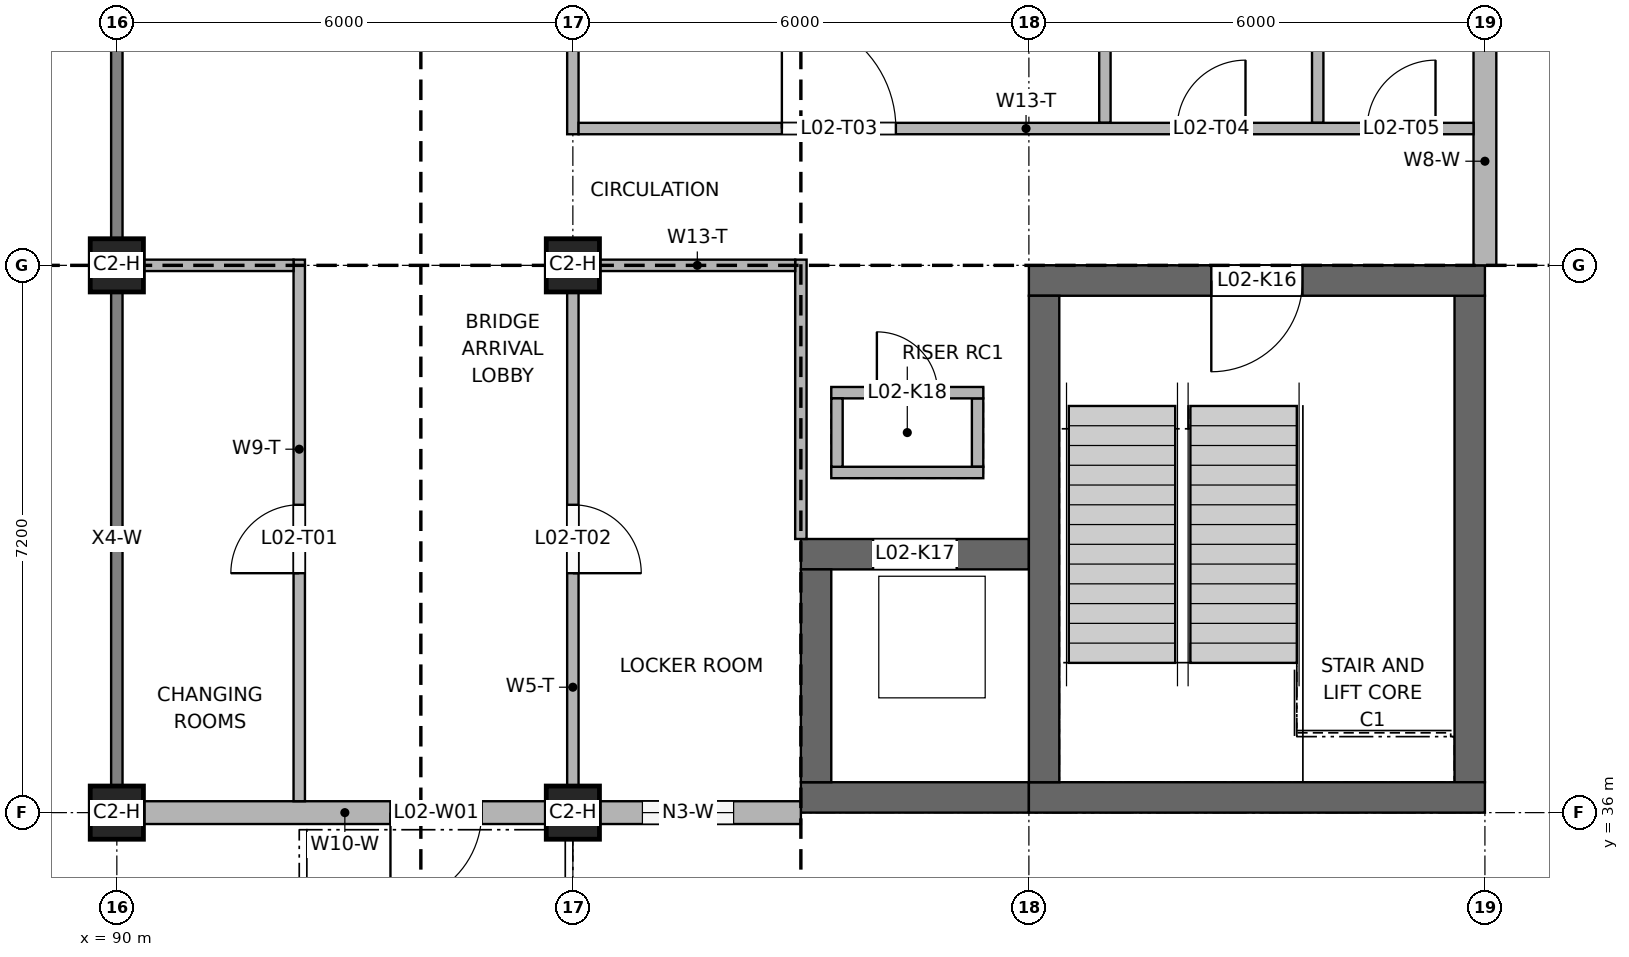
"""IFC4 building model, lengths in metres.
Left out: names, types, materials, properties, quantities, classifications, styles, units other than length and angle.
Written with IfcOpenShell. Run it as: python <this file> out.ifc"""

import sys

from ifc_helpers import new_model, si_unit, direction, frame, frame_2d, origin, origin_2d, place, context, subcontext, project, spatial, rectangle, extrude, element, fill, save


model = new_model("IFC4")
c1 = context("Model", 3, precision=1e-05, world=origin(), true_north=direction((0.0, 1.0)))
c2 = subcontext(c1, "Body", "Model", "MODEL_VIEW")
j1 = project(units=[si_unit("LENGTHUNIT", "METRE"), si_unit("PLANEANGLEUNIT", "RADIAN")], contexts=[c1])
p1 = place(None, origin())
s1 = spatial("IfcSite", under=j1, at=p1, CompositionType="ELEMENT")
p2 = place(p1, origin())
s2 = spatial("IfcBuilding", under=s1, at=p2, CompositionType="ELEMENT")
p3 = place(p2, frame((0.0, 0.0, 8.4)))
s3 = spatial("IfcBuildingStorey", under=s2, at=p3, CompositionType="ELEMENT", Elevation=8.4)
p4 = place(p3, frame((102.0, 36.2, 0.0), z_axis=(0.0, 0.0, 1.0), x_axis=(1.0, 0.0, 0.0)))
e1 = element("IfcWall", 1, at=p4, inside=s3, PredefinedType="SHEAR", context=c2, shape_type="SweptSolid", body=[
    extrude(rectangle(XDim=6.0, YDim=0.4, at=frame_2d((3.0, 0.0))), origin(), (0.0, 0.0, 1.0), 4.0),
])
p5 = place(p3, frame((102.0, 43.0, 0.0), z_axis=(0.0, 0.0, 1.0), x_axis=(1.0, 0.0, 0.0)))
e2 = element("IfcWall", 2, at=p5, inside=s3, PredefinedType="SHEAR", context=c2, shape_type="SweptSolid", body=[
    extrude(rectangle(XDim=6.0, YDim=0.4, at=frame_2d((3.0, 0.0))), origin(), (0.0, 0.0, 1.0), 4.0),
])
p6 = place(p5, frame((2.4, 0.0, 0.0)))
e3 = element("IfcOpeningElement", 3, at=p6, cuts=e2, PredefinedType="OPENING", context=c2, shape_type="SweptSolid", body=[
    extrude(rectangle(XDim=1.2, YDim=2.1, at=frame_2d((0.6, 1.05))), frame((0.0, 0.21, 0.0), z_axis=(0.0, -1.0, 0.0), x_axis=(1.0, 0.0, 0.0)), (0.0, 0.0, 1.0), 0.42),
])
for number, where, z_axis, x_axis in (
    (4, (102.2, 36.4, 0.0), (0.0, 0.0, 1.0), (0.0, 1.0, 0.0)),
    (5, (107.8, 36.4, 0.0), (0.0, 0.0, 1.0), (0.0, 1.0, 0.0)),
):
    element("IfcWall", number, at=place(p3, frame(where, z_axis=z_axis, x_axis=x_axis)), inside=s3, PredefinedType="SHEAR", context=c2, shape_type="SweptSolid", body=[
        extrude(rectangle(XDim=6.4, YDim=0.4, at=frame_2d((3.2, 0.0))), origin(), (0.0, 0.0, 1.0), 4.0),
    ])
p7 = place(p3, frame((99.0, 36.2, 0.0), z_axis=(0.0, 0.0, 1.0), x_axis=(1.0, 0.0, 0.0)))
e6 = element("IfcWall", 6, at=p7, inside=s3, PredefinedType="SHEAR", context=c2, shape_type="SweptSolid", body=[
    extrude(rectangle(XDim=3.0, YDim=0.4, at=frame_2d((1.5, 0.0))), origin(), (0.0, 0.0, 1.0), 4.2),
])
p8 = place(p3, frame((99.0, 39.4, 0.0), z_axis=(0.0, 0.0, 1.0), x_axis=(1.0, 0.0, 0.0)))
e7 = element("IfcWall", 7, at=p8, inside=s3, PredefinedType="SHEAR", context=c2, shape_type="SweptSolid", body=[
    extrude(rectangle(XDim=3.0, YDim=0.4, at=frame_2d((1.5, 0.0))), origin(), (0.0, 0.0, 1.0), 4.2),
])
p9 = place(p8, frame((0.95, 0.0, 0.0)))
e8 = element("IfcOpeningElement", 8, at=p9, cuts=e7, PredefinedType="OPENING", context=c2, shape_type="SweptSolid", body=[
    extrude(rectangle(XDim=1.1, YDim=2.1, at=frame_2d((0.55, 1.05))), frame((0.0, 0.21, 0.0), z_axis=(0.0, -1.0, 0.0), x_axis=(1.0, 0.0, 0.0)), (0.0, 0.0, 1.0), 0.42),
])
p10 = place(p3, frame((99.2, 36.4, 0.0), z_axis=(0.0, 0.0, 1.0), x_axis=(0.0, 1.0, 0.0)))
e9 = element("IfcWall", 9, at=p10, inside=s3, PredefinedType="SHEAR", context=c2, shape_type="SweptSolid", body=[
    extrude(rectangle(XDim=2.8, YDim=0.4, at=frame_2d((1.4, 0.0))), origin(), (0.0, 0.0, 1.0), 4.2),
])
p11 = place(p3, frame((99.4, 40.475, 0.0), z_axis=(0.0, 0.0, 1.0), x_axis=(1.0, 0.0, 0.0)))
e10 = element("IfcWall", 10, at=p11, inside=s3, PredefinedType="SOLIDWALL", context=c2, shape_type="SweptSolid", body=[
    extrude(rectangle(XDim=2.0, YDim=0.15, at=frame_2d((1.0, 0.0))), origin(), (0.0, 0.0, 1.0), 4.2),
])
p12 = place(p3, frame((99.4, 41.525, 0.0), z_axis=(0.0, 0.0, 1.0), x_axis=(1.0, 0.0, 0.0)))
e11 = element("IfcWall", 11, at=p12, inside=s3, PredefinedType="SOLIDWALL", context=c2, shape_type="SweptSolid", body=[
    extrude(rectangle(XDim=2.0, YDim=0.15, at=frame_2d((1.0, 0.0))), origin(), (0.0, 0.0, 1.0), 4.2),
])
p13 = place(p12, frame((0.6, 0.0, 0.0)))
e12 = element("IfcOpeningElement", 12, at=p13, cuts=e11, PredefinedType="OPENING", context=c2, shape_type="SweptSolid", body=[
    extrude(rectangle(XDim=0.8, YDim=2.1, at=frame_2d((0.4, 1.05))), frame((0.0, 0.085, 0.0), z_axis=(0.0, -1.0, 0.0), x_axis=(1.0, 0.0, 0.0)), (0.0, 0.0, 1.0), 0.17),
])
for number, where, z_axis, x_axis in (
    (13, (99.475, 40.55, 0.0), (0.0, 0.0, 1.0), (0.0, 1.0, 0.0)),
    (14, (101.325, 40.55, 0.0), (0.0, 0.0, 1.0), (0.0, 1.0, 0.0)),
):
    element("IfcWall", number, at=place(p3, frame(where, z_axis=z_axis, x_axis=x_axis)), inside=s3, PredefinedType="SOLIDWALL", context=c2, shape_type="SweptSolid", body=[
        extrude(rectangle(XDim=0.9, YDim=0.15, at=frame_2d((0.45, 0.0))), origin(), (0.0, 0.0, 1.0), 4.2),
    ])
for number, where, z_axis, x_axis in (
    (15, (90.0, 36.0, 0.0), (0.0, 0.0, 1.0), (1.0, 0.0, 0.0)),
    (16, (96.0, 36.0, 0.0), (0.0, 0.0, 1.0), (1.0, 0.0, 0.0)),
    (17, (90.0, 43.2, 0.0), (0.0, 0.0, 1.0), (1.0, 0.0, 0.0)),
    (18, (96.0, 43.2, 0.0), (0.0, 0.0, 1.0), (1.0, 0.0, 0.0)),
):
    element("IfcColumn", number, at=place(p3, frame(where, z_axis=z_axis, x_axis=x_axis)), inside=s3, PredefinedType="COLUMN", context=c2, shape_type="SweptSolid", body=[
        extrude(rectangle(XDim=0.7, YDim=0.7, at=origin_2d()), origin(), (0.0, 0.0, 1.0), 4.0),
    ])
p14 = place(p3, frame((108.0, 43.2, 0.0), z_axis=(0.0, 0.0, 1.0), x_axis=(0.0, 1.0, 0.0)))
e19 = element("IfcWall", 19, at=p14, inside=s3, PredefinedType="SOLIDWALL", context=c2, shape_type="SweptSolid", body=[
    extrude(rectangle(XDim=6.85, YDim=0.3, at=frame_2d((3.425, 0.0))), origin(), (0.0, 0.0, 1.0), 3.1),
])
p15 = place(p14, frame((2.87, 0.0, 0.9)))
e20 = element("IfcOpeningElement", 20, at=p15, cuts=e19, PredefinedType="OPENING", context=c2, shape_type="SweptSolid", body=[
    extrude(rectangle(XDim=1.2, YDim=1.5, at=frame_2d((0.6, 0.75))), frame((0.0, 0.16, 0.0), z_axis=(0.0, -1.0, 0.0), x_axis=(1.0, 0.0, 0.0)), (0.0, 0.0, 1.0), 0.32),
])
p16 = place(p14, frame((4.86, 0.0, 0.9)))
e21 = element("IfcOpeningElement", 21, at=p16, cuts=e19, PredefinedType="OPENING", context=c2, shape_type="SweptSolid", body=[
    extrude(rectangle(XDim=1.2, YDim=1.5, at=frame_2d((0.6, 0.75))), frame((0.0, 0.16, 0.0), z_axis=(0.0, -1.0, 0.0), x_axis=(1.0, 0.0, 0.0)), (0.0, 0.0, 1.0), 0.32),
])
p17 = place(p3, frame((90.35, 36.0, 0.0), z_axis=(0.0, 0.0, 1.0), x_axis=(1.0, 0.0, 0.0)))
e22 = element("IfcWall", 22, at=p17, inside=s3, PredefinedType="SOLIDWALL", context=c2, shape_type="SweptSolid", body=[
    extrude(rectangle(XDim=5.3, YDim=0.3, at=frame_2d((2.65, 0.0))), origin(), (0.0, 0.0, 1.0), 3.3),
])
p18 = place(p17, frame((3.25, 0.0, 0.0)))
e23 = element("IfcOpeningElement", 23, at=p18, cuts=e22, PredefinedType="OPENING", context=c2, shape_type="SweptSolid", body=[
    extrude(rectangle(XDim=1.2, YDim=2.4, at=frame_2d((0.6, 1.2))), frame((0.0, 0.16, 0.0), z_axis=(0.0, -1.0, 0.0), x_axis=(1.0, 0.0, 0.0)), (0.0, 0.0, 1.0), 0.32),
])
p19 = place(p3, frame((96.35, 36.0, 0.0), z_axis=(0.0, 0.0, 1.0), x_axis=(1.0, 0.0, 0.0)))
e24 = element("IfcWall", 24, at=p19, inside=s3, PredefinedType="SOLIDWALL", context=c2, shape_type="SweptSolid", body=[
    extrude(rectangle(XDim=2.65, YDim=0.3, at=frame_2d((1.325, 0.0))), origin(), (0.0, 0.0, 1.0), 3.3),
])
p20 = place(p19, frame((0.565, 0.0, 0.9)))
e25 = element("IfcOpeningElement", 25, at=p20, cuts=e24, PredefinedType="OPENING", context=c2, shape_type="SweptSolid", body=[
    extrude(rectangle(XDim=1.2, YDim=1.5, at=frame_2d((0.6, 0.75))), frame((0.0, 0.16, 0.0), z_axis=(0.0, -1.0, 0.0), x_axis=(1.0, 0.0, 0.0)), (0.0, 0.0, 1.0), 0.32),
])
p21 = place(p3, frame((92.4, 36.15, 0.0), z_axis=(0.0, 0.0, 1.0), x_axis=(0.0, 1.0, 0.0)))
e26 = element("IfcWall", 26, at=p21, inside=s3, PredefinedType="PARTITIONING", context=c2, shape_type="SweptSolid", body=[
    extrude(rectangle(XDim=7.125, YDim=0.15, at=frame_2d((3.562, 0.0))), origin(), (0.0, 0.0, 1.0), 3.3),
])
p22 = place(p21, frame((3.0, 0.0, 0.0)))
e27 = element("IfcOpeningElement", 27, at=p22, cuts=e26, PredefinedType="OPENING", context=c2, shape_type="SweptSolid", body=[
    extrude(rectangle(XDim=0.9, YDim=2.1, at=frame_2d((0.45, 1.05))), frame((0.0, 0.085, 0.0), z_axis=(0.0, -1.0, 0.0), x_axis=(1.0, 0.0, 0.0)), (0.0, 0.0, 1.0), 0.17),
])
p23 = place(p3, frame((96.0, 36.35, 0.0), z_axis=(0.0, 0.0, 1.0), x_axis=(0.0, 1.0, 0.0)))
e28 = element("IfcWall", 28, at=p23, inside=s3, PredefinedType="PARTITIONING", context=c2, shape_type="SweptSolid", body=[
    extrude(rectangle(XDim=6.5, YDim=0.15, at=frame_2d((3.25, 0.0))), origin(), (0.0, 0.0, 1.0), 3.2),
])
p24 = place(p23, frame((2.8, 0.0, 0.0)))
e29 = element("IfcOpeningElement", 29, at=p24, cuts=e28, PredefinedType="OPENING", context=c2, shape_type="SweptSolid", body=[
    extrude(rectangle(XDim=0.9, YDim=2.1, at=frame_2d((0.45, 1.05))), frame((0.0, 0.085, 0.0), z_axis=(0.0, -1.0, 0.0), x_axis=(1.0, 0.0, 0.0)), (0.0, 0.0, 1.0), 0.17),
])
p25 = place(p3, frame((96.0, 44.925, 0.0), z_axis=(0.0, 0.0, 1.0), x_axis=(0.0, 1.0, 0.0)))
e30 = element("IfcWall", 30, at=p25, inside=s3, PredefinedType="PARTITIONING", context=c2, shape_type="SweptSolid", body=[
    extrude(rectangle(XDim=5.475, YDim=0.15, at=frame_2d((2.737, 0.0))), origin(), (0.0, 0.0, 1.0), 4.0),
])
p26 = place(p3, frame((99.0, 39.6, 0.0), z_axis=(0.0, 0.0, 1.0), x_axis=(0.0, 1.0, 0.0)))
e31 = element("IfcWall", 31, at=p26, inside=s3, PredefinedType="PARTITIONING", context=c2, shape_type="SweptSolid", body=[
    extrude(rectangle(XDim=3.675, YDim=0.15, at=frame_2d((1.837, 0.0))), origin(), (0.0, 0.0, 1.0), 4.0),
])
for number, where, z_axis, x_axis in (
    (32, (103.0, 45.075, 0.0), (0.0, 0.0, 1.0), (0.0, 1.0, 0.0)),
    (33, (105.8, 45.075, 0.0), (0.0, 0.0, 1.0), (0.0, 1.0, 0.0)),
):
    element("IfcWall", number, at=place(p3, frame(where, z_axis=z_axis, x_axis=x_axis)), inside=s3, PredefinedType="PARTITIONING", context=c2, shape_type="SweptSolid", body=[
        extrude(rectangle(XDim=12.375, YDim=0.15, at=frame_2d((6.188, 0.0))), origin(), (0.0, 0.0, 1.0), 3.3),
    ])
p27 = place(p3, frame((90.35, 43.2, 0.0), z_axis=(0.0, 0.0, 1.0), x_axis=(1.0, 0.0, 0.0)))
e34 = element("IfcWall", 34, at=p27, inside=s3, PredefinedType="PARTITIONING", context=c2, shape_type="SweptSolid", body=[
    extrude(rectangle(XDim=1.975, YDim=0.15, at=frame_2d((0.987, 0.0))), origin(), (0.0, 0.0, 1.0), 3.3),
])
p28 = place(p3, frame((96.35, 43.2, 0.0), z_axis=(0.0, 0.0, 1.0), x_axis=(1.0, 0.0, 0.0)))
e35 = element("IfcWall", 35, at=p28, inside=s3, PredefinedType="PARTITIONING", context=c2, shape_type="SweptSolid", body=[
    extrude(rectangle(XDim=2.575, YDim=0.15, at=frame_2d((1.288, 0.0))), origin(), (0.0, 0.0, 1.0), 4.0),
])
p29 = place(p3, frame((96.075, 45.0, 0.0), z_axis=(0.0, 0.0, 1.0), x_axis=(1.0, 0.0, 0.0)))
e36 = element("IfcWall", 36, at=p29, inside=s3, PredefinedType="PARTITIONING", context=c2, shape_type="SweptSolid", body=[
    extrude(rectangle(XDim=11.775, YDim=0.15, at=frame_2d((5.888, 0.0))), origin(), (0.0, 0.0, 1.0), 4.0),
])
p30 = place(p29, frame((2.675, 0.0, 0.0)))
e37 = element("IfcOpeningElement", 37, at=p30, cuts=e36, PredefinedType="OPENING", context=c2, shape_type="SweptSolid", body=[
    extrude(rectangle(XDim=1.5, YDim=2.1, at=frame_2d((0.75, 1.05))), frame((0.0, 0.085, 0.0), z_axis=(0.0, -1.0, 0.0), x_axis=(1.0, 0.0, 0.0)), (0.0, 0.0, 1.0), 0.17),
])
p31 = place(p29, frame((7.875, 0.0, 0.0)))
e38 = element("IfcOpeningElement", 38, at=p31, cuts=e36, PredefinedType="OPENING", context=c2, shape_type="SweptSolid", body=[
    extrude(rectangle(XDim=0.9, YDim=2.1, at=frame_2d((0.45, 1.05))), frame((0.0, 0.085, 0.0), z_axis=(0.0, -1.0, 0.0), x_axis=(1.0, 0.0, 0.0)), (0.0, 0.0, 1.0), 0.17),
])
p32 = place(p29, frame((10.375, 0.0, 0.0)))
e39 = element("IfcOpeningElement", 39, at=p32, cuts=e36, PredefinedType="OPENING", context=c2, shape_type="SweptSolid", body=[
    extrude(rectangle(XDim=0.9, YDim=2.1, at=frame_2d((0.45, 1.05))), frame((0.0, 0.085, 0.0), z_axis=(0.0, -1.0, 0.0), x_axis=(1.0, 0.0, 0.0)), (0.0, 0.0, 1.0), 0.17),
])
p33 = place(p18, frame((1.2, 0.0, 0.0), z_axis=(0.0, 0.0, 1.0), x_axis=(-1.0, 0.0, 0.0)))
e40 = element("IfcDoor", 40, at=p33, inside=s3, OperationType="SINGLE_SWING_RIGHT", PredefinedType="DOOR", context=c2, shape_type="SweptSolid", body=[
    extrude(rectangle(XDim=1.2, YDim=2.4, at=frame_2d((0.6, 1.2))), frame((0.0, 0.025, 0.0), z_axis=(0.0, -1.0, 0.0), x_axis=(1.0, 0.0, 0.0)), (0.0, 0.0, 1.0), 0.05),
])
fill(e23, e40)
p34 = place(p20, origin())
e41 = element("IfcWindow", 41, at=p34, inside=s3, PartitioningType="SINGLE_PANEL", PredefinedType="WINDOW", context=c2, shape_type="SweptSolid", body=[
    extrude(rectangle(XDim=1.2, YDim=1.5, at=frame_2d((0.6, 0.75))), frame((0.0, 0.03, 0.0), z_axis=(0.0, -1.0, 0.0), x_axis=(1.0, 0.0, 0.0)), (0.0, 0.0, 1.0), 0.06),
])
fill(e25, e41)
p35 = place(p6, frame((1.2, 0.0, 0.0), z_axis=(0.0, 0.0, 1.0), x_axis=(-1.0, 0.0, 0.0)))
e42 = element("IfcDoor", 42, at=p35, inside=s3, OperationType="SINGLE_SWING_RIGHT", PredefinedType="DOOR", context=c2, shape_type="SweptSolid", body=[
    extrude(rectangle(XDim=1.2, YDim=2.1, at=frame_2d((0.6, 1.05))), frame((0.0, 0.025, 0.0), z_axis=(0.0, -1.0, 0.0), x_axis=(1.0, 0.0, 0.0)), (0.0, 0.0, 1.0), 0.05),
])
fill(e3, e42)
p36 = place(p9, origin())
e43 = element("IfcDoor", 43, at=p36, inside=s3, OperationType="DOUBLE_DOOR_SLIDING", PredefinedType="DOOR", context=c2, shape_type="SweptSolid", body=[
    extrude(rectangle(XDim=1.1, YDim=2.1, at=frame_2d((0.55, 1.05))), frame((0.0, 0.025, 0.0), z_axis=(0.0, -1.0, 0.0), x_axis=(1.0, 0.0, 0.0)), (0.0, 0.0, 1.0), 0.05),
])
fill(e8, e43)
p37 = place(p13, origin())
e44 = element("IfcDoor", 44, at=p37, inside=s3, OperationType="SINGLE_SWING_LEFT", PredefinedType="DOOR", context=c2, shape_type="SweptSolid", body=[
    extrude(rectangle(XDim=0.8, YDim=2.1, at=frame_2d((0.4, 1.05))), frame((0.0, 0.025, 0.0), z_axis=(0.0, -1.0, 0.0), x_axis=(1.0, 0.0, 0.0)), (0.0, 0.0, 1.0), 0.05),
])
fill(e12, e44)
p38 = place(p22, origin())
e45 = element("IfcDoor", 45, at=p38, inside=s3, OperationType="SINGLE_SWING_LEFT", PredefinedType="DOOR", context=c2, shape_type="SweptSolid", body=[
    extrude(rectangle(XDim=0.9, YDim=2.1, at=frame_2d((0.45, 1.05))), frame((0.0, 0.025, 0.0), z_axis=(0.0, -1.0, 0.0), x_axis=(1.0, 0.0, 0.0)), (0.0, 0.0, 1.0), 0.05),
])
fill(e27, e45)
p39 = place(p24, frame((0.9, 0.0, 0.0), z_axis=(0.0, 0.0, 1.0), x_axis=(-1.0, 0.0, 0.0)))
e46 = element("IfcDoor", 46, at=p39, inside=s3, OperationType="SINGLE_SWING_RIGHT", PredefinedType="DOOR", context=c2, shape_type="SweptSolid", body=[
    extrude(rectangle(XDim=0.9, YDim=2.1, at=frame_2d((0.45, 1.05))), frame((0.0, 0.025, 0.0), z_axis=(0.0, -1.0, 0.0), x_axis=(1.0, 0.0, 0.0)), (0.0, 0.0, 1.0), 0.05),
])
fill(e29, e46)
p40 = place(p30, origin())
e47 = element("IfcDoor", 47, at=p40, inside=s3, OperationType="SINGLE_SWING_LEFT", PredefinedType="DOOR", context=c2, shape_type="SweptSolid", body=[
    extrude(rectangle(XDim=1.5, YDim=2.1, at=frame_2d((0.75, 1.05))), frame((0.0, 0.025, 0.0), z_axis=(0.0, -1.0, 0.0), x_axis=(1.0, 0.0, 0.0)), (0.0, 0.0, 1.0), 0.05),
])
fill(e37, e47)
p41 = place(p31, origin())
e48 = element("IfcDoor", 48, at=p41, inside=s3, OperationType="SINGLE_SWING_RIGHT", PredefinedType="DOOR", context=c2, shape_type="SweptSolid", body=[
    extrude(rectangle(XDim=0.9, YDim=2.1, at=frame_2d((0.45, 1.05))), frame((0.0, 0.025, 0.0), z_axis=(0.0, -1.0, 0.0), x_axis=(1.0, 0.0, 0.0)), (0.0, 0.0, 1.0), 0.05),
])
fill(e38, e48)
p42 = place(p32, origin())
e49 = element("IfcDoor", 49, at=p42, inside=s3, OperationType="SINGLE_SWING_RIGHT", PredefinedType="DOOR", context=c2, shape_type="SweptSolid", body=[
    extrude(rectangle(XDim=0.9, YDim=2.1, at=frame_2d((0.45, 1.05))), frame((0.0, 0.025, 0.0), z_axis=(0.0, -1.0, 0.0), x_axis=(1.0, 0.0, 0.0)), (0.0, 0.0, 1.0), 0.05),
])
fill(e39, e49)
save(model, sys.argv[1])
